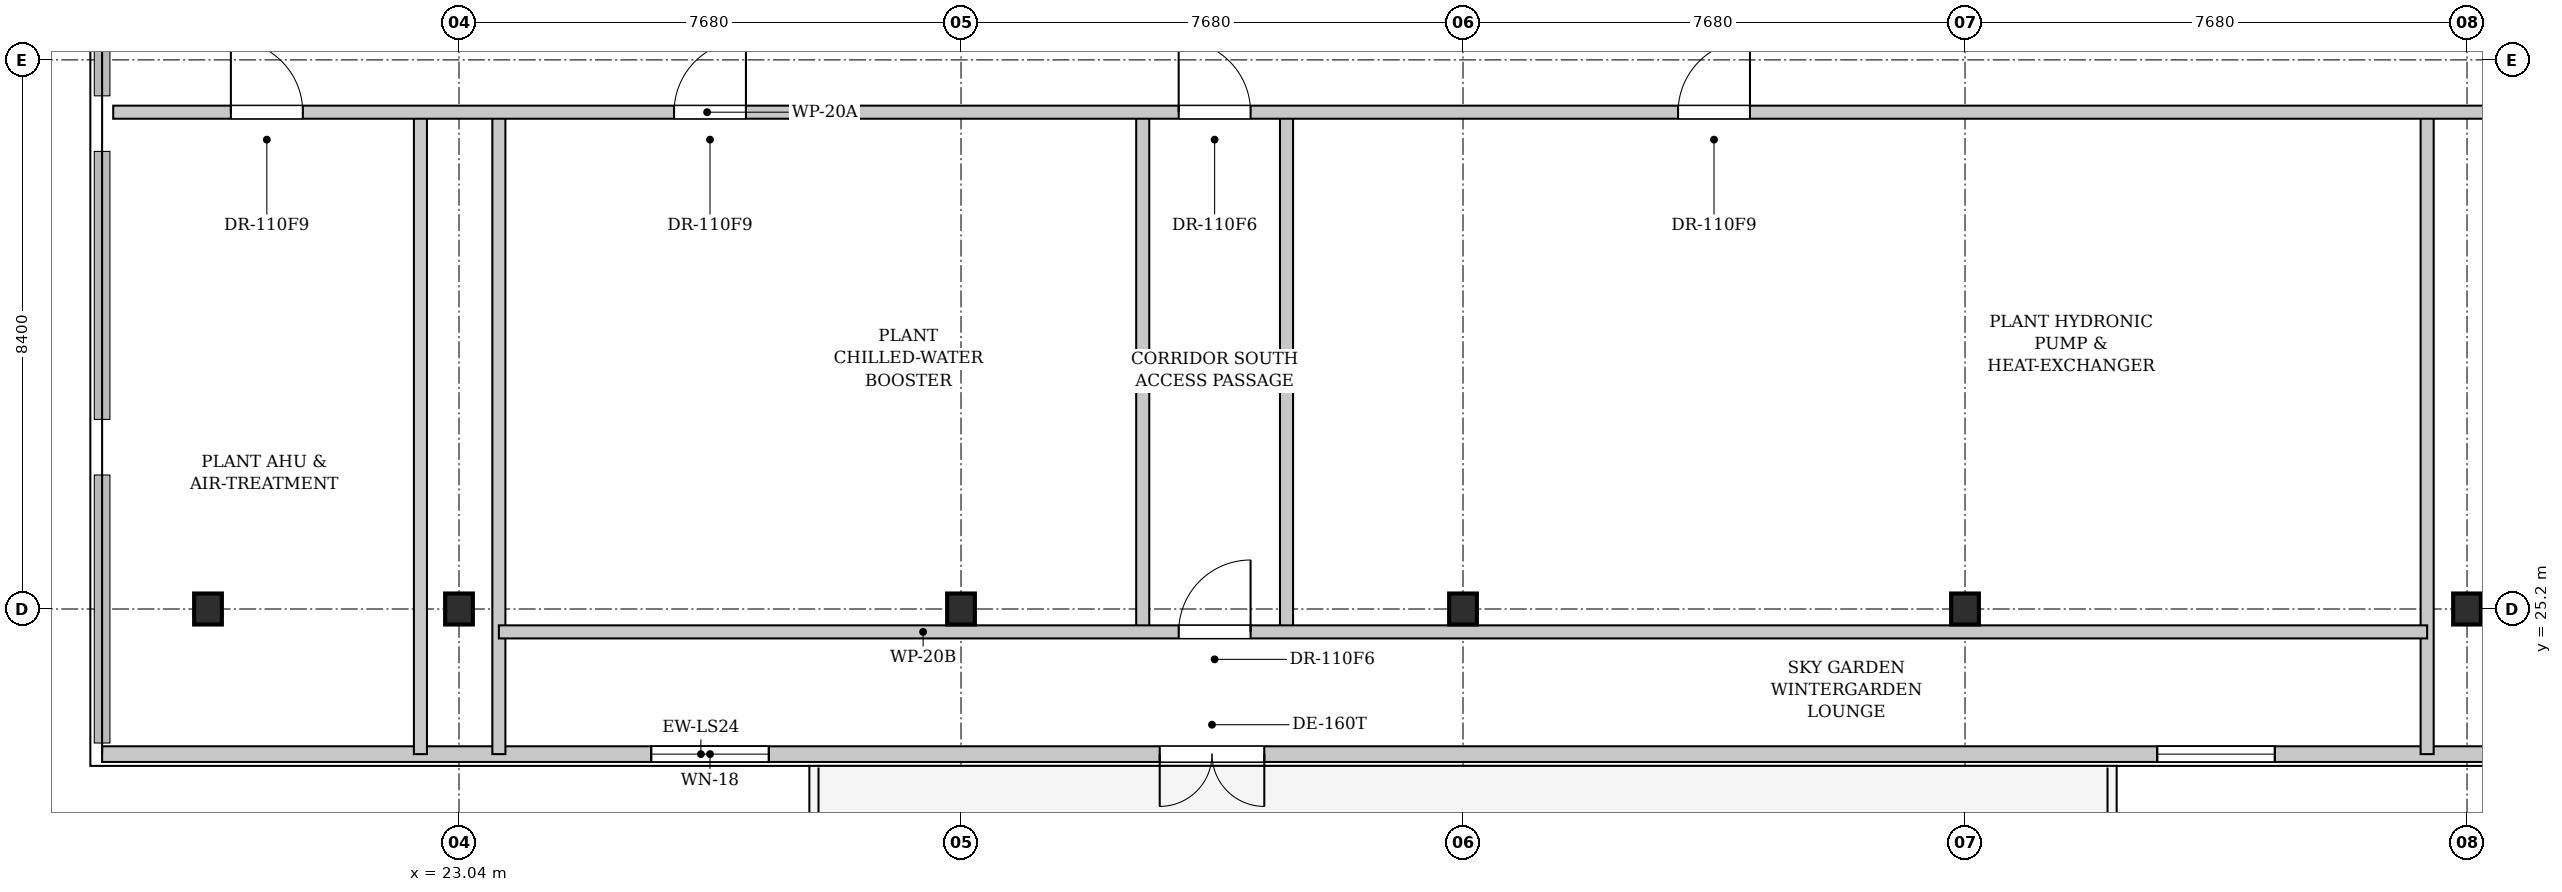
"""IFC4 building model, lengths in metres.
Left out: names, types, materials, properties, quantities, classifications, styles, units other than length and angle.
Written with IfcOpenShell. Run it as: python <this file> out.ifc"""

import sys

from ifc_helpers import new_model, si_unit, direction, frame, frame_2d, origin, origin_2d, place, context, subcontext, project, spatial, rectangle, i_section, extrude, element, fill, save


model = new_model("IFC4")
c1 = context("Model", 3, precision=1e-05, world=origin(), true_north=direction((0.0, 1.0)))
c2 = subcontext(c1, "Body", "Model", "MODEL_VIEW")
j1 = project(units=[si_unit("LENGTHUNIT", "METRE"), si_unit("PLANEANGLEUNIT", "RADIAN")], contexts=[c1])
p1 = place(None, origin())
s1 = spatial("IfcSite", under=j1, at=p1, CompositionType="ELEMENT")
p2 = place(p1, origin())
s2 = spatial("IfcBuilding", under=s1, at=p2, CompositionType="ELEMENT")
p3 = place(p2, frame((0.0, 0.0, 137.3)))
s3 = spatial("IfcBuildingStorey", under=s2, at=p3, CompositionType="ELEMENT", Elevation=137.3)
for number, where, z_axis, x_axis in (
    (1, (23.04, 25.2, 0.0), (0.0, 0.0, 1.0), (1.0, 0.0, 0.0)),
    (2, (30.72, 25.2, 0.0), (0.0, 0.0, 1.0), (1.0, 0.0, 0.0)),
    (3, (38.4, 25.2, 0.0), (0.0, 0.0, 1.0), (1.0, 0.0, 0.0)),
    (4, (46.08, 25.2, 0.0), (0.0, 0.0, 1.0), (1.0, 0.0, 0.0)),
    (5, (53.76, 25.2, 0.0), (0.0, 0.0, 1.0), (1.0, 0.0, 0.0)),
    (6, (19.2, 25.2, 0.0), (0.0, 0.0, 1.0), (1.0, 0.0, 0.0)),
):
    element("IfcColumn", number, at=place(p3, frame(where, z_axis=z_axis, x_axis=x_axis)), inside=s3, PredefinedType="COLUMN", context=c2, shape_type="SweptSolid", body=[
        extrude(i_section(OverallWidth=0.424, OverallDepth=0.474, WebThickness=0.047, FlangeThickness=0.077, FilletRadius=0.015, at=origin_2d()), origin(), (0.0, 0.0, 1.0), 3.9),
    ])
p4 = place(p3, frame((17.58, 22.98, 0.0), z_axis=(0.0, 0.0, 1.0), x_axis=(1.0, 0.0, 0.0)))
e7 = element("IfcWall", 7, at=p4, inside=s3, PredefinedType="SOLIDWALL", context=c2, shape_type="SweptSolid", body=[
    extrude(rectangle(XDim=41.64, YDim=0.24, at=frame_2d((20.82, 0.0))), origin(), (0.0, 0.0, 1.0), 3.68),
])
p5 = place(p4, frame((16.18, 0.0, 0.0)))
e8 = element("IfcOpeningElement", 8, at=p5, cuts=e7, PredefinedType="OPENING", context=c2, shape_type="SweptSolid", body=[
    extrude(rectangle(XDim=1.6, YDim=2.25, at=frame_2d((0.8, 1.125))), frame((0.0, 0.13, 0.0), z_axis=(0.0, -1.0, 0.0), x_axis=(1.0, 0.0, 0.0)), (0.0, 0.0, 1.0), 0.26),
])
p6 = place(p4, frame((8.4, 0.0, 0.9)))
e9 = element("IfcOpeningElement", 9, at=p6, cuts=e7, PredefinedType="OPENING", context=c2, shape_type="SweptSolid", body=[
    extrude(rectangle(XDim=1.8, YDim=2.0, at=frame_2d((0.9, 1.0))), frame((0.0, 0.13, 0.0), z_axis=(0.0, -1.0, 0.0), x_axis=(1.0, 0.0, 0.0)), (0.0, 0.0, 1.0), 0.26),
])
p7 = place(p4, frame((31.44, 0.0, 0.9)))
e10 = element("IfcOpeningElement", 10, at=p7, cuts=e7, PredefinedType="OPENING", context=c2, shape_type="SweptSolid", body=[
    extrude(rectangle(XDim=1.8, YDim=2.0, at=frame_2d((0.9, 1.0))), frame((0.0, 0.13, 0.0), z_axis=(0.0, -1.0, 0.0), x_axis=(1.0, 0.0, 0.0)), (0.0, 0.0, 1.0), 0.26),
])
for number, where, z_axis, x_axis in (
    (11, (22.45, 22.98, 0.0), (0.0, 0.0, 1.0), (0.0, 1.0, 0.0)),
    (12, (23.65, 22.98, 0.0), (0.0, 0.0, 1.0), (0.0, 1.0, 0.0)),
    (13, (53.15, 22.98, 0.0), (0.0, 0.0, 1.0), (0.0, 1.0, 0.0)),
):
    element("IfcWall", number, at=place(p3, frame(where, z_axis=z_axis, x_axis=x_axis)), inside=s3, PredefinedType="PARTITIONING", context=c2, shape_type="SweptSolid", body=[
        extrude(rectangle(XDim=9.82, YDim=0.2, at=frame_2d((4.91, 0.0))), origin(), (0.0, 0.0, 1.0), 3.68),
    ])
for number, where, z_axis, x_axis in (
    (14, (33.5, 24.85, 0.0), (0.0, 0.0, 1.0), (0.0, 1.0, 0.0)),
    (15, (35.7, 24.85, 0.0), (0.0, 0.0, 1.0), (0.0, 1.0, 0.0)),
):
    element("IfcWall", number, at=place(p3, frame(where, z_axis=z_axis, x_axis=x_axis)), inside=s3, PredefinedType="PARTITIONING", context=c2, shape_type="SweptSolid", body=[
        extrude(rectangle(XDim=7.95, YDim=0.2, at=frame_2d((3.975, 0.0))), origin(), (0.0, 0.0, 1.0), 3.68),
    ])
p8 = place(p3, frame((23.65, 24.85, 0.0), z_axis=(0.0, 0.0, 1.0), x_axis=(1.0, 0.0, 0.0)))
e16 = element("IfcWall", 16, at=p8, inside=s3, PredefinedType="PARTITIONING", context=c2, shape_type="SweptSolid", body=[
    extrude(rectangle(XDim=29.5, YDim=0.2, at=frame_2d((14.75, 0.0))), origin(), (0.0, 0.0, 1.0), 3.68),
])
p9 = place(p8, frame((10.4, 0.0, 0.0)))
e17 = element("IfcOpeningElement", 17, at=p9, cuts=e16, PredefinedType="OPENING", context=c2, shape_type="SweptSolid", body=[
    extrude(rectangle(XDim=1.1, YDim=2.15, at=frame_2d((0.55, 1.075))), frame((0.0, 0.11, 0.0), z_axis=(0.0, -1.0, 0.0), x_axis=(1.0, 0.0, 0.0)), (0.0, 0.0, 1.0), 0.22),
])
p10 = place(p3, frame((17.75, 32.8, 0.0), z_axis=(0.0, 0.0, 1.0), x_axis=(1.0, 0.0, 0.0)))
e18 = element("IfcWall", 18, at=p10, inside=s3, PredefinedType="PARTITIONING", context=c2, shape_type="SweptSolid", body=[
    extrude(rectangle(XDim=41.3, YDim=0.2, at=frame_2d((20.65, 0.0))), origin(), (0.0, 0.0, 1.0), 3.68),
])
p11 = place(p10, frame((1.8, 0.0, 0.0)))
e19 = element("IfcOpeningElement", 19, at=p11, cuts=e18, PredefinedType="OPENING", context=c2, shape_type="SweptSolid", body=[
    extrude(rectangle(XDim=1.1, YDim=2.15, at=frame_2d((0.55, 1.075))), frame((0.0, 0.11, 0.0), z_axis=(0.0, -1.0, 0.0), x_axis=(1.0, 0.0, 0.0)), (0.0, 0.0, 1.0), 0.22),
])
p12 = place(p10, frame((8.58, 0.0, 0.0)))
e20 = element("IfcOpeningElement", 20, at=p12, cuts=e18, PredefinedType="OPENING", context=c2, shape_type="SweptSolid", body=[
    extrude(rectangle(XDim=1.1, YDim=2.15, at=frame_2d((0.55, 1.075))), frame((0.0, 0.11, 0.0), z_axis=(0.0, -1.0, 0.0), x_axis=(1.0, 0.0, 0.0)), (0.0, 0.0, 1.0), 0.22),
])
p13 = place(p10, frame((16.3, 0.0, 0.0)))
e21 = element("IfcOpeningElement", 21, at=p13, cuts=e18, PredefinedType="OPENING", context=c2, shape_type="SweptSolid", body=[
    extrude(rectangle(XDim=1.1, YDim=2.15, at=frame_2d((0.55, 1.075))), frame((0.0, 0.11, 0.0), z_axis=(0.0, -1.0, 0.0), x_axis=(1.0, 0.0, 0.0)), (0.0, 0.0, 1.0), 0.22),
])
p14 = place(p10, frame((23.94, 0.0, 0.0)))
e22 = element("IfcOpeningElement", 22, at=p14, cuts=e18, PredefinedType="OPENING", context=c2, shape_type="SweptSolid", body=[
    extrude(rectangle(XDim=1.1, YDim=2.15, at=frame_2d((0.55, 1.075))), frame((0.0, 0.11, 0.0), z_axis=(0.0, -1.0, 0.0), x_axis=(1.0, 0.0, 0.0)), (0.0, 0.0, 1.0), 0.22),
])
p15 = place(p10, frame((38.4, 0.0, 0.0)))
e23 = element("IfcOpeningElement", 23, at=p15, cuts=e18, PredefinedType="OPENING", context=c2, shape_type="SweptSolid", body=[
    extrude(rectangle(XDim=1.1, YDim=2.15, at=frame_2d((0.55, 1.075))), frame((0.0, 0.11, 0.0), z_axis=(0.0, -1.0, 0.0), x_axis=(1.0, 0.0, 0.0)), (0.0, 0.0, 1.0), 0.22),
])
p16 = place(p5, frame((1.6, 0.0, 0.0), z_axis=(0.0, 0.0, 1.0), x_axis=(-1.0, 0.0, 0.0)))
e24 = element("IfcDoor", 24, at=p16, inside=s3, OperationType="SINGLE_SWING_LEFT", PredefinedType="DOOR", context=c2, shape_type="SweptSolid", body=[
    extrude(rectangle(XDim=1.6, YDim=2.25, at=frame_2d((0.8, 1.125))), frame((0.0, 0.025, 0.0), z_axis=(0.0, -1.0, 0.0), x_axis=(1.0, 0.0, 0.0)), (0.0, 0.0, 1.0), 0.05),
])
fill(e8, e24)
p17 = place(p6, origin())
e25 = element("IfcWindow", 25, at=p17, inside=s3, PartitioningType="SINGLE_PANEL", PredefinedType="WINDOW", context=c2, shape_type="SweptSolid", body=[
    extrude(rectangle(XDim=1.8, YDim=2.0, at=frame_2d((0.9, 1.0))), frame((0.0, 0.03, 0.0), z_axis=(0.0, -1.0, 0.0), x_axis=(1.0, 0.0, 0.0)), (0.0, 0.0, 1.0), 0.06),
])
fill(e9, e25)
p18 = place(p7, origin())
e26 = element("IfcWindow", 26, at=p18, inside=s3, PartitioningType="SINGLE_PANEL", PredefinedType="WINDOW", context=c2, shape_type="SweptSolid", body=[
    extrude(rectangle(XDim=1.8, YDim=2.0, at=frame_2d((0.9, 1.0))), frame((0.0, 0.03, 0.0), z_axis=(0.0, -1.0, 0.0), x_axis=(1.0, 0.0, 0.0)), (0.0, 0.0, 1.0), 0.06),
])
fill(e10, e26)
p19 = place(p9, origin())
e27 = element("IfcDoor", 27, at=p19, inside=s3, OperationType="SINGLE_SWING_RIGHT", PredefinedType="DOOR", context=c2, shape_type="SweptSolid", body=[
    extrude(rectangle(XDim=1.1, YDim=2.15, at=frame_2d((0.55, 1.075))), frame((0.0, 0.025, 0.0), z_axis=(0.0, -1.0, 0.0), x_axis=(1.0, 0.0, 0.0)), (0.0, 0.0, 1.0), 0.05),
])
fill(e17, e27)
p20 = place(p11, origin())
e28 = element("IfcDoor", 28, at=p20, inside=s3, OperationType="SINGLE_SWING_LEFT", PredefinedType="DOOR", context=c2, shape_type="SweptSolid", body=[
    extrude(rectangle(XDim=1.1, YDim=2.15, at=frame_2d((0.55, 1.075))), frame((0.0, 0.025, 0.0), z_axis=(0.0, -1.0, 0.0), x_axis=(1.0, 0.0, 0.0)), (0.0, 0.0, 1.0), 0.05),
])
fill(e19, e28)
p21 = place(p12, origin())
e29 = element("IfcDoor", 29, at=p21, inside=s3, OperationType="SINGLE_SWING_RIGHT", PredefinedType="DOOR", context=c2, shape_type="SweptSolid", body=[
    extrude(rectangle(XDim=1.1, YDim=2.15, at=frame_2d((0.55, 1.075))), frame((0.0, 0.025, 0.0), z_axis=(0.0, -1.0, 0.0), x_axis=(1.0, 0.0, 0.0)), (0.0, 0.0, 1.0), 0.05),
])
fill(e20, e29)
p22 = place(p13, origin())
e30 = element("IfcDoor", 30, at=p22, inside=s3, OperationType="SINGLE_SWING_LEFT", PredefinedType="DOOR", context=c2, shape_type="SweptSolid", body=[
    extrude(rectangle(XDim=1.1, YDim=2.15, at=frame_2d((0.55, 1.075))), frame((0.0, 0.025, 0.0), z_axis=(0.0, -1.0, 0.0), x_axis=(1.0, 0.0, 0.0)), (0.0, 0.0, 1.0), 0.05),
])
fill(e21, e30)
p23 = place(p14, origin())
e31 = element("IfcDoor", 31, at=p23, inside=s3, OperationType="SINGLE_SWING_RIGHT", PredefinedType="DOOR", context=c2, shape_type="SweptSolid", body=[
    extrude(rectangle(XDim=1.1, YDim=2.15, at=frame_2d((0.55, 1.075))), frame((0.0, 0.025, 0.0), z_axis=(0.0, -1.0, 0.0), x_axis=(1.0, 0.0, 0.0)), (0.0, 0.0, 1.0), 0.05),
])
fill(e22, e31)
save(model, sys.argv[1])
